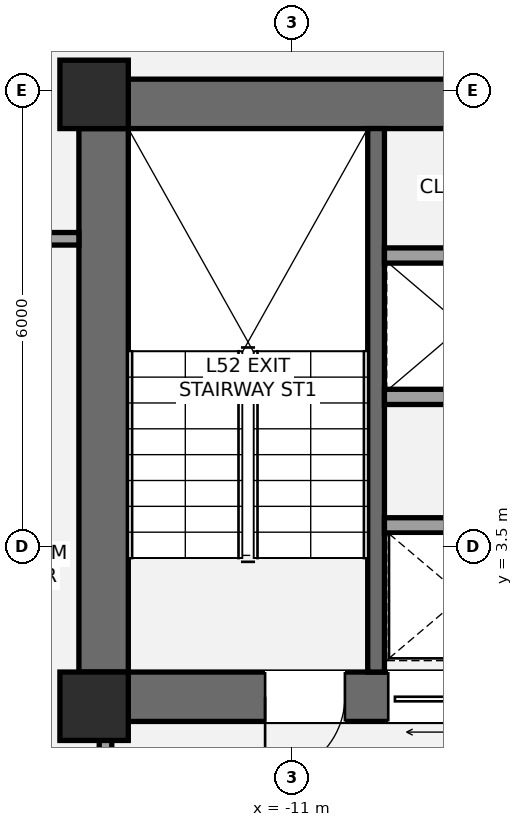
"""IFC4 building model, lengths in metres.
Left out: names, types, materials, properties, quantities, classifications, styles, units other than length and angle.
Written with IfcOpenShell. Run it as: python <this file> out.ifc"""

import sys

from ifc_helpers import new_model, si_unit, direction, frame, frame_2d, origin, origin_2d, place, context, subcontext, project, spatial, rectangle, extrude, element, fill, save


model = new_model("IFC4")
c1 = context("Model", 3, precision=1e-05, world=origin(), true_north=direction((0.0, 1.0)))
c2 = subcontext(c1, "Body", "Model", "MODEL_VIEW")
j1 = project(units=[si_unit("LENGTHUNIT", "METRE"), si_unit("PLANEANGLEUNIT", "RADIAN")], contexts=[c1])
p1 = place(None, origin())
s1 = spatial("IfcSite", under=j1, at=p1, CompositionType="ELEMENT")
p2 = place(p1, origin())
s2 = spatial("IfcBuilding", under=s1, at=p2, CompositionType="ELEMENT")
p3 = place(p2, frame((0.0, 0.0, 188.6)))
s3 = spatial("IfcBuildingStorey", under=s2, at=p3, CompositionType="ELEMENT", Elevation=188.6)
p4 = place(p3, frame((-13.475, 1.2, 0.0), z_axis=(0.0, 0.0, 1.0), x_axis=(0.0, 1.0, 0.0)))
e1 = element("IfcWall", 1, at=p4, inside=s3, PredefinedType="SHEAR", context=c2, shape_type="SweptSolid", body=[
    extrude(rectangle(XDim=8.45, YDim=0.65, at=frame_2d((4.225, 0.0))), origin(), (0.0, 0.0, 1.0), 3.2),
])
p5 = place(p3, frame((-13.8, 9.325, 0.0), z_axis=(0.0, 0.0, 1.0), x_axis=(1.0, 0.0, 0.0)))
e2 = element("IfcWall", 2, at=p5, inside=s3, PredefinedType="SHEAR", context=c2, shape_type="SweptSolid", body=[
    extrude(rectangle(XDim=9.325, YDim=0.65, at=frame_2d((4.663, 0.0))), origin(), (0.0, 0.0, 1.0), 3.2),
])
p6 = place(p3, frame((-4.875, 1.525, 0.0), z_axis=(0.0, 0.0, 1.0), x_axis=(-1.0, 0.0, 0.0)))
e3 = element("IfcWall", 3, at=p6, inside=s3, PredefinedType="SHEAR", context=c2, shape_type="SweptSolid", body=[
    extrude(rectangle(XDim=8.925, YDim=0.65, at=frame_2d((4.462, 0.0))), origin(), (0.0, 0.0, 1.0), 3.2),
])
p7 = place(p6, frame((5.425, 0.0, 0.0)))
e4 = element("IfcOpeningElement", 4, at=p7, cuts=e3, PredefinedType="OPENING", context=c2, shape_type="SweptSolid", body=[
    extrude(rectangle(XDim=1.05, YDim=2.15, at=frame_2d((0.525, 1.075))), frame((0.0, 0.335, 0.0), z_axis=(0.0, -1.0, 0.0), x_axis=(1.0, 0.0, 0.0)), (0.0, 0.0, 1.0), 0.67),
])
p8 = place(p6, frame((3.755, 0.0, 0.0)))
e5 = element("IfcOpeningElement", 5, at=p8, cuts=e3, PredefinedType="OPENING", context=c2, shape_type="SweptSolid", body=[
    extrude(rectangle(XDim=1.1, YDim=2.2, at=frame_2d((0.55, 1.1))), frame((0.0, 0.335, 0.0), z_axis=(0.0, -1.0, 0.0), x_axis=(1.0, 0.0, 0.0)), (0.0, 0.0, 1.0), 0.67),
])
p9 = place(p3, frame((-9.89, 1.85, 0.0), z_axis=(0.0, 0.0, 1.0), x_axis=(0.0, 1.0, 0.0)))
e6 = element("IfcWall", 6, at=p9, inside=s3, PredefinedType="SHEAR", context=c2, shape_type="SweptSolid", body=[
    extrude(rectangle(XDim=7.15, YDim=0.22, at=frame_2d((3.575, 0.0))), origin(), (0.0, 0.0, 1.0), 3.2),
])
for number, where, z_axis, x_axis in (
    (7, (-13.6, 1.4, 0.0), (0.0, 0.0, 1.0), (1.0, 0.0, 0.0)),
    (8, (-13.6, 9.45, 0.0), (0.0, 0.0, 1.0), (1.0, 0.0, 0.0)),
):
    element("IfcColumn", number, at=place(p3, frame(where, z_axis=z_axis, x_axis=x_axis)), inside=s3, PredefinedType="COLUMN", context=c2, shape_type="SweptSolid", body=[
        extrude(rectangle(XDim=0.9, YDim=0.9, at=origin_2d()), origin(), (0.0, 0.0, 1.0), 3.2),
    ])
p10 = place(p3, frame((-13.45, -2.15, 0.0), z_axis=(0.0, 0.0, 1.0), x_axis=(0.0, 1.0, 0.0)))
e9 = element("IfcWall", 9, at=p10, inside=s3, PredefinedType="PARTITIONING", context=c2, shape_type="SweptSolid", body=[
    extrude(rectangle(XDim=3.4, YDim=0.165, at=frame_2d((1.7, 0.0))), origin(), (0.0, 0.0, 1.0), 2.473),
])
p11 = place(p10, frame((1.15, 0.0, 0.0)))
e10 = element("IfcOpeningElement", 10, at=p11, cuts=e9, PredefinedType="OPENING", context=c2, shape_type="SweptSolid", body=[
    extrude(rectangle(XDim=1.05, YDim=2.15, at=frame_2d((0.525, 1.075))), frame((0.0, 0.093, 0.0), z_axis=(0.0, -1.0, 0.0), x_axis=(1.0, 0.0, 0.0)), (0.0, 0.0, 1.0), 0.185),
])
for number, where, z_axis, x_axis in (
    (11, (-9.78, 3.78, 0.0), (0.0, 0.0, 1.0), (1.0, 0.0, 0.0)),
    (12, (-9.78, 5.47, 0.0), (0.0, 0.0, 1.0), (1.0, 0.0, 0.0)),
    (13, (-9.78, 7.33, 0.0), (0.0, 0.0, 1.0), (1.0, 0.0, 0.0)),
):
    element("IfcWall", number, at=place(p3, frame(where, z_axis=z_axis, x_axis=x_axis)), inside=s3, PredefinedType="SOLIDWALL", context=c2, shape_type="SweptSolid", body=[
        extrude(rectangle(XDim=4.255, YDim=0.2, at=frame_2d((2.127, 0.0))), origin(), (0.0, 0.0, 1.0), 3.02),
    ])
p12 = place(p3, frame((-16.1, 7.55, 0.0), z_axis=(0.0, 0.0, 1.0), x_axis=(1.0, 0.0, 0.0)))
e14 = element("IfcWall", 14, at=p12, inside=s3, PredefinedType="PARTITIONING", context=c2, shape_type="SweptSolid", body=[
    extrude(rectangle(XDim=2.3, YDim=0.165, at=frame_2d((1.15, 0.0))), origin(), (0.0, 0.0, 1.0), 2.473),
])
p13 = place(p12, frame((0.3, 0.0, 0.0)))
e15 = element("IfcOpeningElement", 15, at=p13, cuts=e14, PredefinedType="OPENING", context=c2, shape_type="SweptSolid", body=[
    extrude(rectangle(XDim=1.0, YDim=2.15, at=frame_2d((0.5, 1.075))), frame((0.0, 0.093, 0.0), z_axis=(0.0, -1.0, 0.0), x_axis=(1.0, 0.0, 0.0)), (0.0, 0.0, 1.0), 0.185),
])
p14 = place(p7, origin())
e16 = element("IfcDoor", 16, at=p14, inside=s3, OperationType="SINGLE_SWING_RIGHT", PredefinedType="DOOR", context=c2, shape_type="SweptSolid", body=[
    extrude(rectangle(XDim=1.05, YDim=2.15, at=frame_2d((0.525, 1.075))), frame((0.0, 0.025, 0.0), z_axis=(0.0, -1.0, 0.0), x_axis=(1.0, 0.0, 0.0)), (0.0, 0.0, 1.0), 0.05),
])
fill(e4, e16)
p15 = place(p8, origin())
e17 = element("IfcDoor", 17, at=p15, inside=s3, OperationType="SLIDING_TO_LEFT", PredefinedType="DOOR", context=c2, shape_type="SweptSolid", body=[
    extrude(rectangle(XDim=1.1, YDim=2.2, at=frame_2d((0.55, 1.1))), frame((0.0, 0.025, 0.0), z_axis=(0.0, -1.0, 0.0), x_axis=(1.0, 0.0, 0.0)), (0.0, 0.0, 1.0), 0.05),
])
fill(e5, e17)
save(model, sys.argv[1])
